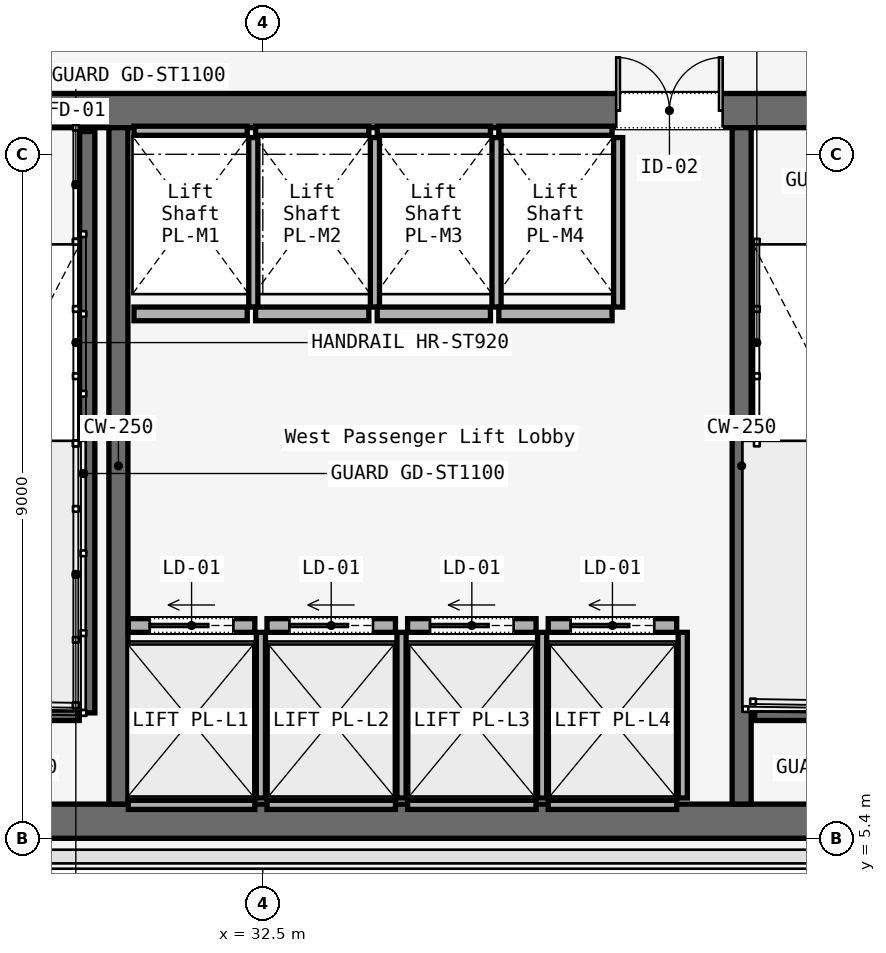
"""IFC4 building model, lengths in metres.
Left out: names, types, materials, properties, quantities, classifications, styles, units other than length and angle.
Written with IfcOpenShell. Run it as: python <this file> out.ifc"""

import sys

from ifc_helpers import new_model, si_unit, direction, frame, frame_2d, origin, place, context, subcontext, project, spatial, rectangle, extrude, element, fill, save


model = new_model("IFC4")
c1 = context("Model", 3, precision=1e-05, world=origin(), true_north=direction((0.0, 1.0)))
c2 = subcontext(c1, "Body", "Model", "MODEL_VIEW")
j1 = project(units=[si_unit("LENGTHUNIT", "METRE"), si_unit("PLANEANGLEUNIT", "RADIAN")], contexts=[c1])
p1 = place(None, origin())
s1 = spatial("IfcSite", under=j1, at=p1, CompositionType="ELEMENT")
p2 = place(p1, origin())
s2 = spatial("IfcBuilding", under=s1, at=p2, CompositionType="ELEMENT")
p3 = place(p2, frame((0.0, 0.0, 104.4)))
s3 = spatial("IfcBuildingStorey", under=s2, at=p3, CompositionType="ELEMENT", Elevation=104.4)
p4 = place(p3, frame((26.45, 14.975, 0.0), z_axis=(0.0, 0.0, 1.0), x_axis=(1.0, 0.0, 0.0)))
e1 = element("IfcWall", 1, at=p4, inside=s3, PredefinedType="SOLIDWALL", context=c2, shape_type="SweptSolid", body=[
    extrude(rectangle(XDim=31.1, YDim=0.45, at=frame_2d((15.55, 0.0))), origin(), (0.0, 0.0, 1.0), 3.58),
])
p5 = place(p4, frame((1.65, 0.0, 0.0)))
e2 = element("IfcOpeningElement", 2, at=p5, cuts=e1, PredefinedType="OPENING", context=c2, shape_type="SweptSolid", body=[
    extrude(rectangle(XDim=1.1, YDim=2.2, at=frame_2d((0.55, 1.1))), frame((0.0, 0.225, 0.0), z_axis=(0.0, -1.0, 0.0), x_axis=(1.0, 0.0, 0.0)), (0.0, 0.0, 1.0), 0.45),
])
p6 = place(p4, frame((13.65, 0.0, 0.0)))
e3 = element("IfcOpeningElement", 3, at=p6, cuts=e1, PredefinedType="OPENING", context=c2, shape_type="SweptSolid", body=[
    extrude(rectangle(XDim=1.1, YDim=2.2, at=frame_2d((0.55, 1.1))), frame((0.0, 0.225, 0.0), z_axis=(0.0, -1.0, 0.0), x_axis=(1.0, 0.0, 0.0)), (0.0, 0.0, 1.0), 0.45),
])
p7 = place(p4, frame((25.55, 0.0, 0.0)))
e4 = element("IfcOpeningElement", 4, at=p7, cuts=e1, PredefinedType="OPENING", context=c2, shape_type="SweptSolid", body=[
    extrude(rectangle(XDim=1.1, YDim=2.2, at=frame_2d((0.55, 1.1))), frame((0.0, 0.225, 0.0), z_axis=(0.0, -1.0, 0.0), x_axis=(1.0, 0.0, 0.0)), (0.0, 0.0, 1.0), 0.45),
])
p8 = place(p4, frame((10.7, 0.0, 0.0)))
e5 = element("IfcOpeningElement", 5, at=p8, cuts=e1, PredefinedType="OPENING", context=c2, shape_type="SweptSolid", body=[
    extrude(rectangle(XDim=1.4, YDim=2.2, at=frame_2d((0.7, 1.1))), frame((0.0, 0.225, 0.0), z_axis=(0.0, -1.0, 0.0), x_axis=(1.0, 0.0, 0.0)), (0.0, 0.0, 1.0), 0.45),
])
p9 = place(p4, frame((19.35, 0.0, 0.0)))
e6 = element("IfcOpeningElement", 6, at=p9, cuts=e1, PredefinedType="OPENING", context=c2, shape_type="SweptSolid", body=[
    extrude(rectangle(XDim=1.1, YDim=2.2, at=frame_2d((0.55, 1.1))), frame((0.0, 0.225, 0.0), z_axis=(0.0, -1.0, 0.0), x_axis=(1.0, 0.0, 0.0)), (0.0, 0.0, 1.0), 0.45),
])
p10 = place(p4, frame((21.4, 0.0, 0.0)))
e7 = element("IfcOpeningElement", 7, at=p10, cuts=e1, PredefinedType="OPENING", context=c2, shape_type="SweptSolid", body=[
    extrude(rectangle(XDim=0.9, YDim=2.1, at=frame_2d((0.45, 1.05))), frame((0.0, 0.225, 0.0), z_axis=(0.0, -1.0, 0.0), x_axis=(1.0, 0.0, 0.0)), (0.0, 0.0, 1.0), 0.45),
])
p11 = place(p4, frame((23.35, 0.0, 0.0)))
e8 = element("IfcOpeningElement", 8, at=p11, cuts=e1, PredefinedType="OPENING", context=c2, shape_type="SweptSolid", body=[
    extrude(rectangle(XDim=1.3, YDim=2.3, at=frame_2d((0.65, 1.15))), frame((0.0, 0.225, 0.0), z_axis=(0.0, -1.0, 0.0), x_axis=(1.0, 0.0, 0.0)), (0.0, 0.0, 1.0), 0.45),
])
p12 = place(p3, frame((26.45, 5.625, 0.0), z_axis=(0.0, 0.0, 1.0), x_axis=(1.0, 0.0, 0.0)))
e9 = element("IfcWall", 9, at=p12, inside=s3, PredefinedType="SOLIDWALL", context=c2, shape_type="SweptSolid", body=[
    extrude(rectangle(XDim=31.1, YDim=0.45, at=frame_2d((15.55, 0.0))), origin(), (0.0, 0.0, 1.0), 3.58),
])
for number, where, z_axis, x_axis in (
    (10, (30.6, 5.85, 0.0), (0.0, 0.0, 1.0), (0.0, 1.0, 0.0)),
    (11, (38.8, 5.85, 0.0), (0.0, 0.0, 1.0), (0.0, 1.0, 0.0)),
):
    element("IfcWall", number, at=place(p3, frame(where, z_axis=z_axis, x_axis=x_axis)), inside=s3, PredefinedType="SOLIDWALL", context=c2, shape_type="SweptSolid", body=[
        extrude(rectangle(XDim=8.9, YDim=0.25, at=frame_2d((4.45, 0.0))), origin(), (0.0, 0.0, 1.0), 3.58),
    ])
p13 = place(p3, frame((30.19, 14.7, 0.0), z_axis=(0.0, 0.0, 1.0), x_axis=(0.0, -1.0, 0.0)))
e12 = element("IfcWall", 12, at=p13, inside=s3, PredefinedType="SOLIDWALL", context=c2, shape_type="SweptSolid", body=[
    extrude(rectangle(XDim=7.65, YDim=0.2, at=frame_2d((3.825, 0.0))), origin(), (0.0, 0.0, 1.0), 3.8),
])
for number, where, z_axis, x_axis in (
    (13, (26.97, 7.05, 0.0), (0.0, 0.0, 1.0), (1.0, 0.0, 0.0)),
    (14, (38.97, 7.05, 0.0), (0.0, 0.0, 1.0), (1.0, 0.0, 0.0)),
):
    element("IfcWall", number, at=place(p3, frame(where, z_axis=z_axis, x_axis=x_axis)), inside=s3, PredefinedType="SOLIDWALL", context=c2, shape_type="SweptSolid", body=[
        extrude(rectangle(XDim=3.115, YDim=0.2, at=frame_2d((1.558, 0.0))), origin(), (0.0, 0.0, 1.0), 3.8),
    ])
p14 = place(p3, frame((30.73, 8.2, 0.0), z_axis=(0.0, 0.0, 1.0), x_axis=(1.0, 0.0, 0.0)))
e15 = element("IfcWall", 15, at=p14, inside=s3, PredefinedType="SOLIDWALL", context=c2, shape_type="SweptSolid", body=[
    extrude(rectangle(XDim=1.665, YDim=0.18, at=frame_2d((0.833, 0.0))), origin(), (0.0, 0.0, 1.0), 2.95),
])
p15 = place(p14, frame((0.282, 0.0, 0.0)))
e16 = element("IfcOpeningElement", 16, at=p15, cuts=e15, PredefinedType="OPENING", context=c2, shape_type="SweptSolid", body=[
    extrude(rectangle(XDim=1.1, YDim=2.2, at=frame_2d((0.55, 1.1))), frame((0.0, 0.09, 0.0), z_axis=(0.0, -1.0, 0.0), x_axis=(1.0, 0.0, 0.0)), (0.0, 0.0, 1.0), 0.18),
])
p16 = place(p3, frame((30.73, 5.84, 0.0), z_axis=(0.0, 0.0, 1.0), x_axis=(1.0, 0.0, 0.0)))
e17 = element("IfcWall", 17, at=p16, inside=s3, PredefinedType="SOLIDWALL", context=c2, shape_type="SweptSolid", body=[
    extrude(rectangle(XDim=1.665, YDim=0.12, at=frame_2d((0.833, 0.0))), origin(), (0.0, 0.0, 1.0), 2.95),
])
p17 = place(p3, frame((32.475, 5.93, 0.0), z_axis=(0.0, 0.0, 1.0), x_axis=(0.0, 1.0, 0.0)))
e18 = element("IfcWall", 18, at=p17, inside=s3, PredefinedType="SOLIDWALL", context=c2, shape_type="SweptSolid", body=[
    extrude(rectangle(XDim=2.18, YDim=0.12, at=frame_2d((1.09, 0.0))), origin(), (0.0, 0.0, 1.0), 2.95),
])
p18 = place(p3, frame((32.555, 8.2, 0.0), z_axis=(0.0, 0.0, 1.0), x_axis=(1.0, 0.0, 0.0)))
e19 = element("IfcWall", 19, at=p18, inside=s3, PredefinedType="SOLIDWALL", context=c2, shape_type="SweptSolid", body=[
    extrude(rectangle(XDim=1.69, YDim=0.18, at=frame_2d((0.845, 0.0))), origin(), (0.0, 0.0, 1.0), 2.95),
])
p19 = place(p18, frame((0.295, 0.0, 0.0)))
e20 = element("IfcOpeningElement", 20, at=p19, cuts=e19, PredefinedType="OPENING", context=c2, shape_type="SweptSolid", body=[
    extrude(rectangle(XDim=1.1, YDim=2.2, at=frame_2d((0.55, 1.1))), frame((0.0, 0.09, 0.0), z_axis=(0.0, -1.0, 0.0), x_axis=(1.0, 0.0, 0.0)), (0.0, 0.0, 1.0), 0.18),
])
p20 = place(p3, frame((32.555, 5.84, 0.0), z_axis=(0.0, 0.0, 1.0), x_axis=(1.0, 0.0, 0.0)))
e21 = element("IfcWall", 21, at=p20, inside=s3, PredefinedType="SOLIDWALL", context=c2, shape_type="SweptSolid", body=[
    extrude(rectangle(XDim=1.69, YDim=0.12, at=frame_2d((0.845, 0.0))), origin(), (0.0, 0.0, 1.0), 2.95),
])
p21 = place(p3, frame((34.325, 5.93, 0.0), z_axis=(0.0, 0.0, 1.0), x_axis=(0.0, 1.0, 0.0)))
e22 = element("IfcWall", 22, at=p21, inside=s3, PredefinedType="SOLIDWALL", context=c2, shape_type="SweptSolid", body=[
    extrude(rectangle(XDim=2.18, YDim=0.12, at=frame_2d((1.09, 0.0))), origin(), (0.0, 0.0, 1.0), 2.95),
])
p22 = place(p3, frame((34.405, 8.2, 0.0), z_axis=(0.0, 0.0, 1.0), x_axis=(1.0, 0.0, 0.0)))
e23 = element("IfcWall", 23, at=p22, inside=s3, PredefinedType="SOLIDWALL", context=c2, shape_type="SweptSolid", body=[
    extrude(rectangle(XDim=1.69, YDim=0.18, at=frame_2d((0.845, 0.0))), origin(), (0.0, 0.0, 1.0), 2.95),
])
p23 = place(p22, frame((0.295, 0.0, 0.0)))
e24 = element("IfcOpeningElement", 24, at=p23, cuts=e23, PredefinedType="OPENING", context=c2, shape_type="SweptSolid", body=[
    extrude(rectangle(XDim=1.1, YDim=2.2, at=frame_2d((0.55, 1.1))), frame((0.0, 0.09, 0.0), z_axis=(0.0, -1.0, 0.0), x_axis=(1.0, 0.0, 0.0)), (0.0, 0.0, 1.0), 0.18),
])
p24 = place(p3, frame((34.405, 5.84, 0.0), z_axis=(0.0, 0.0, 1.0), x_axis=(1.0, 0.0, 0.0)))
e25 = element("IfcWall", 25, at=p24, inside=s3, PredefinedType="SOLIDWALL", context=c2, shape_type="SweptSolid", body=[
    extrude(rectangle(XDim=1.69, YDim=0.12, at=frame_2d((0.845, 0.0))), origin(), (0.0, 0.0, 1.0), 2.95),
])
p25 = place(p3, frame((36.175, 5.93, 0.0), z_axis=(0.0, 0.0, 1.0), x_axis=(0.0, 1.0, 0.0)))
e26 = element("IfcWall", 26, at=p25, inside=s3, PredefinedType="SOLIDWALL", context=c2, shape_type="SweptSolid", body=[
    extrude(rectangle(XDim=2.18, YDim=0.12, at=frame_2d((1.09, 0.0))), origin(), (0.0, 0.0, 1.0), 2.95),
])
p26 = place(p3, frame((36.255, 8.2, 0.0), z_axis=(0.0, 0.0, 1.0), x_axis=(1.0, 0.0, 0.0)))
e27 = element("IfcWall", 27, at=p26, inside=s3, PredefinedType="SOLIDWALL", context=c2, shape_type="SweptSolid", body=[
    extrude(rectangle(XDim=1.69, YDim=0.18, at=frame_2d((0.845, 0.0))), origin(), (0.0, 0.0, 1.0), 2.95),
])
p27 = place(p26, frame((0.295, 0.0, 0.0)))
e28 = element("IfcOpeningElement", 28, at=p27, cuts=e27, PredefinedType="OPENING", context=c2, shape_type="SweptSolid", body=[
    extrude(rectangle(XDim=1.1, YDim=2.2, at=frame_2d((0.55, 1.1))), frame((0.0, 0.09, 0.0), z_axis=(0.0, -1.0, 0.0), x_axis=(1.0, 0.0, 0.0)), (0.0, 0.0, 1.0), 0.18),
])
p28 = place(p3, frame((36.255, 5.84, 0.0), z_axis=(0.0, 0.0, 1.0), x_axis=(1.0, 0.0, 0.0)))
e29 = element("IfcWall", 29, at=p28, inside=s3, PredefinedType="SOLIDWALL", context=c2, shape_type="SweptSolid", body=[
    extrude(rectangle(XDim=1.69, YDim=0.12, at=frame_2d((0.845, 0.0))), origin(), (0.0, 0.0, 1.0), 2.95),
])
p29 = place(p3, frame((38.025, 5.93, 0.0), z_axis=(0.0, 0.0, 1.0), x_axis=(0.0, 1.0, 0.0)))
e30 = element("IfcWall", 30, at=p29, inside=s3, PredefinedType="SOLIDWALL", context=c2, shape_type="SweptSolid", body=[
    extrude(rectangle(XDim=2.18, YDim=0.12, at=frame_2d((1.09, 0.0))), origin(), (0.0, 0.0, 1.0), 2.95),
])
p30 = place(p3, frame((30.805, 12.3, 0.0), z_axis=(0.0, 0.0, 1.0), x_axis=(1.0, 0.0, 0.0)))
e31 = element("IfcWall", 31, at=p30, inside=s3, PredefinedType="SOLIDWALL", context=c2, shape_type="SweptSolid", body=[
    extrude(rectangle(XDim=1.49, YDim=0.18, at=frame_2d((0.745, 0.0))), origin(), (0.0, 0.0, 1.0), 2.95),
])
p31 = place(p3, frame((30.805, 14.71, 0.0), z_axis=(0.0, 0.0, 1.0), x_axis=(1.0, 0.0, 0.0)))
e32 = element("IfcWall", 32, at=p31, inside=s3, PredefinedType="SOLIDWALL", context=c2, shape_type="SweptSolid", body=[
    extrude(rectangle(XDim=1.49, YDim=0.12, at=frame_2d((0.745, 0.0))), origin(), (0.0, 0.0, 1.0), 2.95),
])
p32 = place(p3, frame((32.375, 12.39, 0.0), z_axis=(0.0, 0.0, 1.0), x_axis=(0.0, 1.0, 0.0)))
e33 = element("IfcWall", 33, at=p32, inside=s3, PredefinedType="SOLIDWALL", context=c2, shape_type="SweptSolid", body=[
    extrude(rectangle(XDim=2.23, YDim=0.12, at=frame_2d((1.115, 0.0))), origin(), (0.0, 0.0, 1.0), 2.95),
])
p33 = place(p3, frame((32.405, 12.3, 0.0), z_axis=(0.0, 0.0, 1.0), x_axis=(1.0, 0.0, 0.0)))
e34 = element("IfcWall", 34, at=p33, inside=s3, PredefinedType="SOLIDWALL", context=c2, shape_type="SweptSolid", body=[
    extrude(rectangle(XDim=1.49, YDim=0.18, at=frame_2d((0.745, 0.0))), origin(), (0.0, 0.0, 1.0), 2.95),
])
p34 = place(p3, frame((32.405, 14.71, 0.0), z_axis=(0.0, 0.0, 1.0), x_axis=(1.0, 0.0, 0.0)))
e35 = element("IfcWall", 35, at=p34, inside=s3, PredefinedType="SOLIDWALL", context=c2, shape_type="SweptSolid", body=[
    extrude(rectangle(XDim=1.49, YDim=0.12, at=frame_2d((0.745, 0.0))), origin(), (0.0, 0.0, 1.0), 2.95),
])
p35 = place(p3, frame((33.975, 12.39, 0.0), z_axis=(0.0, 0.0, 1.0), x_axis=(0.0, 1.0, 0.0)))
e36 = element("IfcWall", 36, at=p35, inside=s3, PredefinedType="SOLIDWALL", context=c2, shape_type="SweptSolid", body=[
    extrude(rectangle(XDim=2.23, YDim=0.12, at=frame_2d((1.115, 0.0))), origin(), (0.0, 0.0, 1.0), 2.95),
])
p36 = place(p3, frame((34.005, 12.3, 0.0), z_axis=(0.0, 0.0, 1.0), x_axis=(1.0, 0.0, 0.0)))
e37 = element("IfcWall", 37, at=p36, inside=s3, PredefinedType="SOLIDWALL", context=c2, shape_type="SweptSolid", body=[
    extrude(rectangle(XDim=1.49, YDim=0.18, at=frame_2d((0.745, 0.0))), origin(), (0.0, 0.0, 1.0), 2.95),
])
p37 = place(p3, frame((34.005, 14.71, 0.0), z_axis=(0.0, 0.0, 1.0), x_axis=(1.0, 0.0, 0.0)))
e38 = element("IfcWall", 38, at=p37, inside=s3, PredefinedType="SOLIDWALL", context=c2, shape_type="SweptSolid", body=[
    extrude(rectangle(XDim=1.49, YDim=0.12, at=frame_2d((0.745, 0.0))), origin(), (0.0, 0.0, 1.0), 2.95),
])
p38 = place(p3, frame((35.575, 12.39, 0.0), z_axis=(0.0, 0.0, 1.0), x_axis=(0.0, 1.0, 0.0)))
e39 = element("IfcWall", 39, at=p38, inside=s3, PredefinedType="SOLIDWALL", context=c2, shape_type="SweptSolid", body=[
    extrude(rectangle(XDim=2.23, YDim=0.12, at=frame_2d((1.115, 0.0))), origin(), (0.0, 0.0, 1.0), 2.95),
])
p39 = place(p3, frame((35.605, 12.3, 0.0), z_axis=(0.0, 0.0, 1.0), x_axis=(1.0, 0.0, 0.0)))
e40 = element("IfcWall", 40, at=p39, inside=s3, PredefinedType="SOLIDWALL", context=c2, shape_type="SweptSolid", body=[
    extrude(rectangle(XDim=1.49, YDim=0.18, at=frame_2d((0.745, 0.0))), origin(), (0.0, 0.0, 1.0), 2.95),
])
p40 = place(p3, frame((35.605, 14.71, 0.0), z_axis=(0.0, 0.0, 1.0), x_axis=(1.0, 0.0, 0.0)))
e41 = element("IfcWall", 41, at=p40, inside=s3, PredefinedType="SOLIDWALL", context=c2, shape_type="SweptSolid", body=[
    extrude(rectangle(XDim=1.49, YDim=0.12, at=frame_2d((0.745, 0.0))), origin(), (0.0, 0.0, 1.0), 2.95),
])
p41 = place(p3, frame((37.175, 12.39, 0.0), z_axis=(0.0, 0.0, 1.0), x_axis=(0.0, 1.0, 0.0)))
e42 = element("IfcWall", 42, at=p41, inside=s3, PredefinedType="SOLIDWALL", context=c2, shape_type="SweptSolid", body=[
    extrude(rectangle(XDim=2.23, YDim=0.12, at=frame_2d((1.115, 0.0))), origin(), (0.0, 0.0, 1.0), 2.95),
])
p42 = place(p8, origin())
e43 = element("IfcDoor", 43, at=p42, inside=s3, OperationType="DOUBLE_DOOR_SINGLE_SWING", PredefinedType="DOOR", context=c2, shape_type="SweptSolid", body=[
    extrude(rectangle(XDim=1.4, YDim=2.2, at=frame_2d((0.7, 1.1))), frame((0.0, 0.025, 0.0), z_axis=(0.0, -1.0, 0.0), x_axis=(1.0, 0.0, 0.0)), (0.0, 0.0, 1.0), 0.05),
])
fill(e5, e43)
p43 = place(p15, origin())
e44 = element("IfcDoor", 44, at=p43, inside=s3, OperationType="SLIDING_TO_LEFT", PredefinedType="DOOR", context=c2, shape_type="SweptSolid", body=[
    extrude(rectangle(XDim=1.1, YDim=2.2, at=frame_2d((0.55, 1.1))), frame((0.0, 0.025, 0.0), z_axis=(0.0, -1.0, 0.0), x_axis=(1.0, 0.0, 0.0)), (0.0, 0.0, 1.0), 0.05),
])
fill(e16, e44)
p44 = place(p19, origin())
e45 = element("IfcDoor", 45, at=p44, inside=s3, OperationType="SLIDING_TO_LEFT", PredefinedType="DOOR", context=c2, shape_type="SweptSolid", body=[
    extrude(rectangle(XDim=1.1, YDim=2.2, at=frame_2d((0.55, 1.1))), frame((0.0, 0.025, 0.0), z_axis=(0.0, -1.0, 0.0), x_axis=(1.0, 0.0, 0.0)), (0.0, 0.0, 1.0), 0.05),
])
fill(e20, e45)
p45 = place(p23, origin())
e46 = element("IfcDoor", 46, at=p45, inside=s3, OperationType="SLIDING_TO_LEFT", PredefinedType="DOOR", context=c2, shape_type="SweptSolid", body=[
    extrude(rectangle(XDim=1.1, YDim=2.2, at=frame_2d((0.55, 1.1))), frame((0.0, 0.025, 0.0), z_axis=(0.0, -1.0, 0.0), x_axis=(1.0, 0.0, 0.0)), (0.0, 0.0, 1.0), 0.05),
])
fill(e24, e46)
p46 = place(p27, origin())
e47 = element("IfcDoor", 47, at=p46, inside=s3, OperationType="SLIDING_TO_LEFT", PredefinedType="DOOR", context=c2, shape_type="SweptSolid", body=[
    extrude(rectangle(XDim=1.1, YDim=2.2, at=frame_2d((0.55, 1.1))), frame((0.0, 0.025, 0.0), z_axis=(0.0, -1.0, 0.0), x_axis=(1.0, 0.0, 0.0)), (0.0, 0.0, 1.0), 0.05),
])
fill(e28, e47)
save(model, sys.argv[1])
